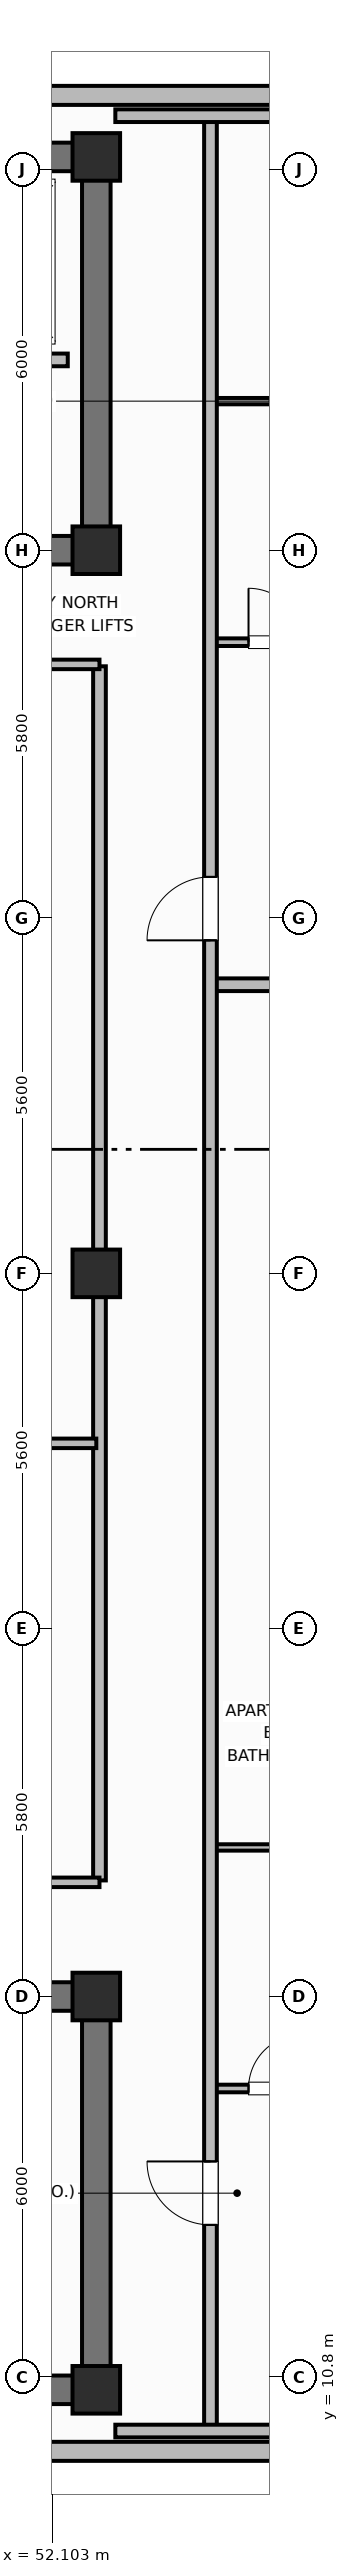
"""IFC4 building model, lengths in metres.
Left out: names, types, materials, properties, quantities, classifications, styles, units other than length and angle.
Written with IfcOpenShell. Run it as: python <this file> out.ifc"""

import sys

from ifc_helpers import new_model, si_unit, direction, frame, frame_2d, origin, origin_2d, place, context, subcontext, project, spatial, rectangle, extrude, element, fill, save


model = new_model("IFC4")
c1 = context("Model", 3, precision=1e-05, world=origin(), true_north=direction((0.0, 1.0)))
c2 = subcontext(c1, "Body", "Model", "MODEL_VIEW")
j1 = project(units=[si_unit("LENGTHUNIT", "METRE"), si_unit("PLANEANGLEUNIT", "RADIAN")], contexts=[c1])
p1 = place(None, origin())
s1 = spatial("IfcSite", under=j1, at=p1, CompositionType="ELEMENT")
p2 = place(p1, origin())
s2 = spatial("IfcBuilding", under=s1, at=p2, CompositionType="ELEMENT")
p3 = place(p2, frame((0.0, 0.0, 282.4)))
s3 = spatial("IfcBuildingStorey", under=s2, at=p3, CompositionType="ELEMENT", Elevation=282.4)
p4 = place(p3, frame((52.8, 10.6, 0.0), z_axis=(0.0, 0.0, 1.0), x_axis=(-1.0, 0.0, 0.0)))
e1 = element("IfcWall", 1, at=p4, inside=s3, PredefinedType="SHEAR", context=c2, shape_type="SweptSolid", body=[
    extrude(rectangle(XDim=27.2, YDim=0.45, at=frame_2d((13.6, 0.0))), origin(), (0.0, 0.0, 1.0), 3.7),
])
p5 = place(p3, frame((52.8, 10.825, 0.0), z_axis=(0.0, 0.0, 1.0), x_axis=(0.0, 1.0, 0.0)))
e2 = element("IfcWall", 2, at=p5, inside=s3, PredefinedType="SHEAR", context=c2, shape_type="SweptSolid", body=[
    extrude(rectangle(XDim=5.75, YDim=0.45, at=frame_2d((2.875, 0.0))), origin(), (0.0, 0.0, 1.0), 3.7),
])
p6 = place(p3, frame((25.6, 16.8, 0.0), z_axis=(0.0, 0.0, 1.0), x_axis=(1.0, 0.0, 0.0)))
e3 = element("IfcWall", 3, at=p6, inside=s3, PredefinedType="SHEAR", context=c2, shape_type="SweptSolid", body=[
    extrude(rectangle(XDim=27.2, YDim=0.45, at=frame_2d((13.6, 0.0))), origin(), (0.0, 0.0, 1.0), 3.7),
])
p7 = place(p6, frame((1.9, 0.0, 0.0)))
e4 = element("IfcOpeningElement", 4, at=p7, cuts=e3, PredefinedType="OPENING", context=c2, shape_type="SweptSolid", body=[
    extrude(rectangle(XDim=1.1, YDim=2.15, at=frame_2d((0.55, 1.075))), frame((0.0, 0.235, 0.0), z_axis=(0.0, -1.0, 0.0), x_axis=(1.0, 0.0, 0.0)), (0.0, 0.0, 1.0), 0.47),
])
p8 = place(p6, frame((13.0, 0.0, 0.0)))
e5 = element("IfcOpeningElement", 5, at=p8, cuts=e3, PredefinedType="OPENING", context=c2, shape_type="SweptSolid", body=[
    extrude(rectangle(XDim=1.2, YDim=2.15, at=frame_2d((0.6, 1.075))), frame((0.0, 0.235, 0.0), z_axis=(0.0, -1.0, 0.0), x_axis=(1.0, 0.0, 0.0)), (0.0, 0.0, 1.0), 0.47),
])
p9 = place(p6, frame((21.6, 0.0, 0.0)))
e6 = element("IfcOpeningElement", 6, at=p9, cuts=e3, PredefinedType="OPENING", context=c2, shape_type="SweptSolid", body=[
    extrude(rectangle(XDim=1.0, YDim=2.15, at=frame_2d((0.5, 1.075))), frame((0.0, 0.235, 0.0), z_axis=(0.0, -1.0, 0.0), x_axis=(1.0, 0.0, 0.0)), (0.0, 0.0, 1.0), 0.47),
])
p10 = place(p3, frame((25.6, 45.8, 0.0), z_axis=(0.0, 0.0, 1.0), x_axis=(1.0, 0.0, 0.0)))
e7 = element("IfcWall", 7, at=p10, inside=s3, PredefinedType="SHEAR", context=c2, shape_type="SweptSolid", body=[
    extrude(rectangle(XDim=27.2, YDim=0.45, at=frame_2d((13.6, 0.0))), origin(), (0.0, 0.0, 1.0), 3.7),
])
p11 = place(p3, frame((52.8, 39.825, 0.0), z_axis=(0.0, 0.0, 1.0), x_axis=(0.0, 1.0, 0.0)))
e8 = element("IfcWall", 8, at=p11, inside=s3, PredefinedType="SHEAR", context=c2, shape_type="SweptSolid", body=[
    extrude(rectangle(XDim=5.75, YDim=0.45, at=frame_2d((2.875, 0.0))), origin(), (0.0, 0.0, 1.0), 3.7),
])
p12 = place(p3, frame((52.8, 39.6, 0.0), z_axis=(0.0, 0.0, 1.0), x_axis=(-1.0, 0.0, 0.0)))
e9 = element("IfcWall", 9, at=p12, inside=s3, PredefinedType="SHEAR", context=c2, shape_type="SweptSolid", body=[
    extrude(rectangle(XDim=27.2, YDim=0.45, at=frame_2d((13.6, 0.0))), origin(), (0.0, 0.0, 1.0), 3.7),
])
p13 = place(p12, frame((24.2, 0.0, 0.0)))
e10 = element("IfcOpeningElement", 10, at=p13, cuts=e9, PredefinedType="OPENING", context=c2, shape_type="SweptSolid", body=[
    extrude(rectangle(XDim=1.1, YDim=2.15, at=frame_2d((0.55, 1.075))), frame((0.0, 0.235, 0.0), z_axis=(0.0, -1.0, 0.0), x_axis=(1.0, 0.0, 0.0)), (0.0, 0.0, 1.0), 0.47),
])
p14 = place(p12, frame((15.1, 0.0, 0.0)))
e11 = element("IfcOpeningElement", 11, at=p14, cuts=e9, PredefinedType="OPENING", context=c2, shape_type="SweptSolid", body=[
    extrude(rectangle(XDim=1.2, YDim=2.15, at=frame_2d((0.6, 1.075))), frame((0.0, 0.235, 0.0), z_axis=(0.0, -1.0, 0.0), x_axis=(1.0, 0.0, 0.0)), (0.0, 0.0, 1.0), 0.47),
])
p15 = place(p12, frame((11.6, 0.0, 0.0)))
e12 = element("IfcOpeningElement", 12, at=p15, cuts=e9, PredefinedType="OPENING", context=c2, shape_type="SweptSolid", body=[
    extrude(rectangle(XDim=0.9, YDim=2.1, at=frame_2d((0.45, 1.05))), frame((0.0, 0.235, 0.0), z_axis=(0.0, -1.0, 0.0), x_axis=(1.0, 0.0, 0.0)), (0.0, 0.0, 1.0), 0.47),
])
p16 = place(p12, frame((7.35, 0.0, 0.0)))
e13 = element("IfcOpeningElement", 13, at=p16, cuts=e9, PredefinedType="OPENING", context=c2, shape_type="SweptSolid", body=[
    extrude(rectangle(XDim=0.85, YDim=2.1, at=frame_2d((0.425, 1.05))), frame((0.0, 0.235, 0.0), z_axis=(0.0, -1.0, 0.0), x_axis=(1.0, 0.0, 0.0)), (0.0, 0.0, 1.0), 0.47),
])
p17 = place(p12, frame((4.2, 0.0, 0.0)))
e14 = element("IfcOpeningElement", 14, at=p17, cuts=e9, PredefinedType="OPENING", context=c2, shape_type="SweptSolid", body=[
    extrude(rectangle(XDim=1.3, YDim=2.2, at=frame_2d((0.65, 1.1))), frame((0.0, 0.235, 0.0), z_axis=(0.0, -1.0, 0.0), x_axis=(1.0, 0.0, 0.0)), (0.0, 0.0, 1.0), 0.47),
])
for number, where, z_axis, x_axis in (
    (15, (52.8, 10.6, 0.0), (0.0, 0.0, 1.0), (1.0, 0.0, 0.0)),
    (16, (52.8, 16.8, 0.0), (0.0, 0.0, 1.0), (1.0, 0.0, 0.0)),
    (17, (52.8, 39.6, 0.0), (0.0, 0.0, 1.0), (1.0, 0.0, 0.0)),
    (18, (52.8, 45.8, 0.0), (0.0, 0.0, 1.0), (1.0, 0.0, 0.0)),
    (19, (52.8, 28.2, 0.0), (0.0, 0.0, 1.0), (1.0, 0.0, 0.0)),
):
    element("IfcColumn", number, at=place(p3, frame(where, z_axis=z_axis, x_axis=x_axis)), inside=s3, PredefinedType="COLUMN", context=c2, shape_type="SweptSolid", body=[
        extrude(rectangle(XDim=0.75, YDim=0.75, at=origin_2d()), origin(), (0.0, 0.0, 1.0), 3.7),
    ])
p18 = place(p3, frame((22.56, 9.63, 0.0), z_axis=(0.0, 0.0, 1.0), x_axis=(1.0, 0.0, 0.0)))
e20 = element("IfcWall", 20, at=p18, inside=s3, PredefinedType="SOLIDWALL", context=c2, shape_type="SweptSolid", body=[
    extrude(rectangle(XDim=33.28, YDim=0.3, at=frame_2d((16.64, 0.0))), origin(), (0.0, 0.0, 1.0), 2.73),
])
p19 = place(p18, frame((5.18, 0.0, 0.71)))
e21 = element("IfcOpeningElement", 21, at=p19, cuts=e20, PredefinedType="OPENING", context=c2, shape_type="SweptSolid", body=[
    extrude(rectangle(XDim=1.6, YDim=1.9, at=frame_2d((0.8, 0.95))), frame((0.0, 0.16, 0.0), z_axis=(0.0, -1.0, 0.0), x_axis=(1.0, 0.0, 0.0)), (0.0, 0.0, 1.0), 0.32),
])
p20 = place(p18, frame((8.733, 0.0, 0.71)))
e22 = element("IfcOpeningElement", 22, at=p20, cuts=e20, PredefinedType="OPENING", context=c2, shape_type="SweptSolid", body=[
    extrude(rectangle(XDim=1.6, YDim=1.9, at=frame_2d((0.8, 0.95))), frame((0.0, 0.16, 0.0), z_axis=(0.0, -1.0, 0.0), x_axis=(1.0, 0.0, 0.0)), (0.0, 0.0, 1.0), 0.32),
])
p21 = place(p18, frame((15.84, 0.0, 0.71)))
e23 = element("IfcOpeningElement", 23, at=p21, cuts=e20, PredefinedType="OPENING", context=c2, shape_type="SweptSolid", body=[
    extrude(rectangle(XDim=1.6, YDim=1.9, at=frame_2d((0.8, 0.95))), frame((0.0, 0.16, 0.0), z_axis=(0.0, -1.0, 0.0), x_axis=(1.0, 0.0, 0.0)), (0.0, 0.0, 1.0), 0.32),
])
p22 = place(p18, frame((22.947, 0.0, 0.71)))
e24 = element("IfcOpeningElement", 24, at=p22, cuts=e20, PredefinedType="OPENING", context=c2, shape_type="SweptSolid", body=[
    extrude(rectangle(XDim=1.6, YDim=1.9, at=frame_2d((0.8, 0.95))), frame((0.0, 0.16, 0.0), z_axis=(0.0, -1.0, 0.0), x_axis=(1.0, 0.0, 0.0)), (0.0, 0.0, 1.0), 0.32),
])
p23 = place(p18, frame((26.5, 0.0, 0.71)))
e25 = element("IfcOpeningElement", 25, at=p23, cuts=e20, PredefinedType="OPENING", context=c2, shape_type="SweptSolid", body=[
    extrude(rectangle(XDim=1.6, YDim=1.9, at=frame_2d((0.8, 0.95))), frame((0.0, 0.16, 0.0), z_axis=(0.0, -1.0, 0.0), x_axis=(1.0, 0.0, 0.0)), (0.0, 0.0, 1.0), 0.32),
])
p24 = place(p3, frame((55.84, 46.77, 0.0), z_axis=(0.0, 0.0, 1.0), x_axis=(-1.0, 0.0, 0.0)))
e26 = element("IfcWall", 26, at=p24, inside=s3, PredefinedType="SOLIDWALL", context=c2, shape_type="SweptSolid", body=[
    extrude(rectangle(XDim=33.28, YDim=0.3, at=frame_2d((16.64, 0.0))), origin(), (0.0, 0.0, 1.0), 2.73),
])
p25 = place(p24, frame((5.596, 0.0, 0.71)))
e27 = element("IfcOpeningElement", 27, at=p25, cuts=e26, PredefinedType="OPENING", context=c2, shape_type="SweptSolid", body=[
    extrude(rectangle(XDim=2.1, YDim=1.9, at=frame_2d((1.05, 0.95))), frame((0.0, 0.16, 0.0), z_axis=(0.0, -1.0, 0.0), x_axis=(1.0, 0.0, 0.0)), (0.0, 0.0, 1.0), 0.32),
])
p26 = place(p24, frame((9.244, 0.0, 0.71)))
e28 = element("IfcOpeningElement", 28, at=p26, cuts=e26, PredefinedType="OPENING", context=c2, shape_type="SweptSolid", body=[
    extrude(rectangle(XDim=2.1, YDim=1.9, at=frame_2d((1.05, 0.95))), frame((0.0, 0.16, 0.0), z_axis=(0.0, -1.0, 0.0), x_axis=(1.0, 0.0, 0.0)), (0.0, 0.0, 1.0), 0.32),
])
p27 = place(p24, frame((13.941, 0.0, 0.71)))
e29 = element("IfcOpeningElement", 29, at=p27, cuts=e26, PredefinedType="OPENING", context=c2, shape_type="SweptSolid", body=[
    extrude(rectangle(XDim=2.1, YDim=1.9, at=frame_2d((1.05, 0.95))), frame((0.0, 0.16, 0.0), z_axis=(0.0, -1.0, 0.0), x_axis=(1.0, 0.0, 0.0)), (0.0, 0.0, 1.0), 0.32),
])
p28 = place(p24, frame((17.239, 0.0, 0.71)))
e30 = element("IfcOpeningElement", 30, at=p28, cuts=e26, PredefinedType="OPENING", context=c2, shape_type="SweptSolid", body=[
    extrude(rectangle(XDim=2.1, YDim=1.9, at=frame_2d((1.05, 0.95))), frame((0.0, 0.16, 0.0), z_axis=(0.0, -1.0, 0.0), x_axis=(1.0, 0.0, 0.0)), (0.0, 0.0, 1.0), 0.32),
])
p29 = place(p24, frame((21.936, 0.0, 0.71)))
e31 = element("IfcOpeningElement", 31, at=p29, cuts=e26, PredefinedType="OPENING", context=c2, shape_type="SweptSolid", body=[
    extrude(rectangle(XDim=2.1, YDim=1.9, at=frame_2d((1.05, 0.95))), frame((0.0, 0.16, 0.0), z_axis=(0.0, -1.0, 0.0), x_axis=(1.0, 0.0, 0.0)), (0.0, 0.0, 1.0), 0.32),
])
p30 = place(p24, frame((25.584, 0.0, 0.71)))
e32 = element("IfcOpeningElement", 32, at=p30, cuts=e26, PredefinedType="OPENING", context=c2, shape_type="SweptSolid", body=[
    extrude(rectangle(XDim=2.1, YDim=1.9, at=frame_2d((1.05, 0.95))), frame((0.0, 0.16, 0.0), z_axis=(0.0, -1.0, 0.0), x_axis=(1.0, 0.0, 0.0)), (0.0, 0.0, 1.0), 0.32),
])
p31 = place(p3, frame((52.35, 42.6, 0.0), z_axis=(0.0, 0.0, 1.0), x_axis=(-1.0, 0.0, 0.0)))
e33 = element("IfcWall", 33, at=p31, inside=s3, PredefinedType="PARTITIONING", context=c2, shape_type="SweptSolid", body=[
    extrude(rectangle(XDim=6.5, YDim=0.2, at=frame_2d((3.25, 0.0))), origin(), (0.0, 0.0, 1.0), 2.56),
])
p32 = place(p31, frame((4.9, 0.0, 0.0)))
e34 = element("IfcOpeningElement", 34, at=p32, cuts=e33, PredefinedType="OPENING", context=c2, shape_type="SweptSolid", body=[
    extrude(rectangle(XDim=1.0, YDim=2.15, at=frame_2d((0.5, 1.075))), frame((0.0, 0.11, 0.0), z_axis=(0.0, -1.0, 0.0), x_axis=(1.0, 0.0, 0.0)), (0.0, 0.0, 1.0), 0.22),
])
p33 = place(p31, frame((2.8, 0.0, 0.0)))
e35 = element("IfcOpeningElement", 35, at=p33, cuts=e33, PredefinedType="OPENING", context=c2, shape_type="SweptSolid", body=[
    extrude(rectangle(XDim=1.0, YDim=2.15, at=frame_2d((0.5, 1.075))), frame((0.0, 0.11, 0.0), z_axis=(0.0, -1.0, 0.0), x_axis=(1.0, 0.0, 0.0)), (0.0, 0.0, 1.0), 0.22),
])
p34 = place(p31, frame((0.7, 0.0, 0.0)))
e36 = element("IfcOpeningElement", 36, at=p34, cuts=e33, PredefinedType="OPENING", context=c2, shape_type="SweptSolid", body=[
    extrude(rectangle(XDim=1.0, YDim=2.15, at=frame_2d((0.5, 1.075))), frame((0.0, 0.11, 0.0), z_axis=(0.0, -1.0, 0.0), x_axis=(1.0, 0.0, 0.0)), (0.0, 0.0, 1.0), 0.22),
])
p35 = place(p3, frame((52.85, 18.63, 0.0), z_axis=(0.0, 0.0, 1.0), x_axis=(0.0, 1.0, 0.0)))
e37 = element("IfcWall", 37, at=p35, inside=s3, PredefinedType="PARTITIONING", context=c2, shape_type="SweptSolid", body=[
    extrude(rectangle(XDim=19.14, YDim=0.2, at=frame_2d((9.57, 0.0))), origin(), (0.0, 0.0, 1.0), 2.56),
])
for number, where, z_axis, x_axis in (
    (38, (29.9, 18.6, 0.0), (0.0, 0.0, 1.0), (1.0, 0.0, 0.0)),
    (39, (29.9, 37.8, 0.0), (0.0, 0.0, 1.0), (1.0, 0.0, 0.0)),
):
    element("IfcWall", number, at=place(p3, frame(where, z_axis=z_axis, x_axis=x_axis)), inside=s3, PredefinedType="PARTITIONING", context=c2, shape_type="SweptSolid", body=[
        extrude(rectangle(XDim=22.95, YDim=0.15, at=frame_2d((11.475, 0.0))), origin(), (0.0, 0.0, 1.0), 2.56),
    ])
p36 = place(p3, frame((29.93, 25.521, 0.0), z_axis=(0.0, 0.0, 1.0), x_axis=(1.0, 0.0, 0.0)))
e40 = element("IfcWall", 40, at=p36, inside=s3, PredefinedType="PARTITIONING", context=c2, shape_type="SweptSolid", body=[
    extrude(rectangle(XDim=22.87, YDim=0.15, at=frame_2d((11.435, 0.0))), origin(), (0.0, 0.0, 1.0), 2.56),
])
p37 = place(p3, frame((54.6, 15.35, 0.0), z_axis=(0.0, 0.0, 1.0), x_axis=(1.0, 0.0, 0.0)))
e41 = element("IfcWall", 41, at=p37, inside=s3, PredefinedType="PARTITIONING", context=c2, shape_type="SweptSolid", body=[
    extrude(rectangle(XDim=1.95, YDim=0.12, at=frame_2d((0.975, 0.0))), origin(), (0.0, 0.0, 1.0), 2.56),
])
p38 = place(p37, frame((0.6, 0.0, 0.0)))
e42 = element("IfcOpeningElement", 42, at=p38, cuts=e41, PredefinedType="OPENING", context=c2, shape_type="SweptSolid", body=[
    extrude(rectangle(XDim=0.85, YDim=2.1, at=frame_2d((0.425, 1.05))), frame((0.0, 0.07, 0.0), z_axis=(0.0, -1.0, 0.0), x_axis=(1.0, 0.0, 0.0)), (0.0, 0.0, 1.0), 0.14),
])
p39 = place(p3, frame((54.6, 19.15, 0.0), z_axis=(0.0, 0.0, 1.0), x_axis=(1.0, 0.0, 0.0)))
e43 = element("IfcWall", 43, at=p39, inside=s3, PredefinedType="PARTITIONING", context=c2, shape_type="SweptSolid", body=[
    extrude(rectangle(XDim=1.95, YDim=0.1, at=frame_2d((0.975, 0.0))), origin(), (0.0, 0.0, 1.0), 2.56),
])
p40 = place(p3, frame((54.6, 32.75, 0.0), z_axis=(0.0, 0.0, 1.0), x_axis=(1.0, 0.0, 0.0)))
e44 = element("IfcWall", 44, at=p40, inside=s3, PredefinedType="PARTITIONING", context=c2, shape_type="SweptSolid", body=[
    extrude(rectangle(XDim=4.27, YDim=0.2, at=frame_2d((2.135, 0.0))), origin(), (0.0, 0.0, 1.0), 2.56),
])
p41 = place(p3, frame((54.6, 38.15, 0.0), z_axis=(0.0, 0.0, 1.0), x_axis=(1.0, 0.0, 0.0)))
e45 = element("IfcWall", 45, at=p41, inside=s3, PredefinedType="PARTITIONING", context=c2, shape_type="SweptSolid", body=[
    extrude(rectangle(XDim=1.95, YDim=0.12, at=frame_2d((0.975, 0.0))), origin(), (0.0, 0.0, 1.0), 2.56),
])
p42 = place(p41, frame((0.6, 0.0, 0.0)))
e46 = element("IfcOpeningElement", 46, at=p42, cuts=e45, PredefinedType="OPENING", context=c2, shape_type="SweptSolid", body=[
    extrude(rectangle(XDim=0.85, YDim=2.1, at=frame_2d((0.425, 1.05))), frame((0.0, 0.07, 0.0), z_axis=(0.0, -1.0, 0.0), x_axis=(1.0, 0.0, 0.0)), (0.0, 0.0, 1.0), 0.14),
])
p43 = place(p3, frame((54.6, 41.95, 0.0), z_axis=(0.0, 0.0, 1.0), x_axis=(1.0, 0.0, 0.0)))
e47 = element("IfcWall", 47, at=p43, inside=s3, PredefinedType="PARTITIONING", context=c2, shape_type="SweptSolid", body=[
    extrude(rectangle(XDim=1.95, YDim=0.1, at=frame_2d((0.975, 0.0))), origin(), (0.0, 0.0, 1.0), 2.56),
])
p44 = place(p3, frame((54.6, 9.95, 0.0), z_axis=(0.0, 0.0, 1.0), x_axis=(0.0, 1.0, 0.0)))
e48 = element("IfcWall", 48, at=p44, inside=s3, PredefinedType="PARTITIONING", context=c2, shape_type="SweptSolid", body=[
    extrude(rectangle(XDim=36.5, YDim=0.2, at=frame_2d((18.25, 0.0))), origin(), (0.0, 0.0, 1.0), 2.56),
])
p45 = place(p44, frame((3.25, 0.0, 0.0)))
e49 = element("IfcOpeningElement", 49, at=p45, cuts=e48, PredefinedType="OPENING", context=c2, shape_type="SweptSolid", body=[
    extrude(rectangle(XDim=1.0, YDim=2.15, at=frame_2d((0.5, 1.075))), frame((0.0, 0.11, 0.0), z_axis=(0.0, -1.0, 0.0), x_axis=(1.0, 0.0, 0.0)), (0.0, 0.0, 1.0), 0.22),
])
p46 = place(p44, frame((23.5, 0.0, 0.0)))
e50 = element("IfcOpeningElement", 50, at=p46, cuts=e48, PredefinedType="OPENING", context=c2, shape_type="SweptSolid", body=[
    extrude(rectangle(XDim=1.0, YDim=2.15, at=frame_2d((0.5, 1.075))), frame((0.0, 0.11, 0.0), z_axis=(0.0, -1.0, 0.0), x_axis=(1.0, 0.0, 0.0)), (0.0, 0.0, 1.0), 0.22),
])
for number, where, z_axis, x_axis in (
    (51, (53.1, 9.95, 0.0), (0.0, 0.0, 1.0), (1.0, 0.0, 0.0)),
    (52, (53.1, 46.45, 0.0), (0.0, 0.0, 1.0), (1.0, 0.0, 0.0)),
):
    element("IfcWall", number, at=place(p3, frame(where, z_axis=z_axis, x_axis=x_axis)), inside=s3, PredefinedType="PARTITIONING", context=c2, shape_type="SweptSolid", body=[
        extrude(rectangle(XDim=3.754, YDim=0.2, at=frame_2d((1.877, 0.0))), origin(), (0.0, 0.0, 1.0), 2.56),
    ])
p47 = place(p38, origin())
e53 = element("IfcDoor", 53, at=p47, inside=s3, OperationType="SINGLE_SWING_RIGHT", PredefinedType="DOOR", context=c2, shape_type="SweptSolid", body=[
    extrude(rectangle(XDim=0.85, YDim=2.1, at=frame_2d((0.425, 1.05))), frame((0.0, 0.025, 0.0), z_axis=(0.0, -1.0, 0.0), x_axis=(1.0, 0.0, 0.0)), (0.0, 0.0, 1.0), 0.05),
])
fill(e42, e53)
p48 = place(p42, origin())
e54 = element("IfcDoor", 54, at=p48, inside=s3, OperationType="SINGLE_SWING_LEFT", PredefinedType="DOOR", context=c2, shape_type="SweptSolid", body=[
    extrude(rectangle(XDim=0.85, YDim=2.1, at=frame_2d((0.425, 1.05))), frame((0.0, 0.025, 0.0), z_axis=(0.0, -1.0, 0.0), x_axis=(1.0, 0.0, 0.0)), (0.0, 0.0, 1.0), 0.05),
])
fill(e46, e54)
p49 = place(p45, origin())
e55 = element("IfcDoor", 55, at=p49, inside=s3, OperationType="SINGLE_SWING_RIGHT", PredefinedType="DOOR", context=c2, shape_type="SweptSolid", body=[
    extrude(rectangle(XDim=1.0, YDim=2.15, at=frame_2d((0.5, 1.075))), frame((0.0, 0.025, 0.0), z_axis=(0.0, -1.0, 0.0), x_axis=(1.0, 0.0, 0.0)), (0.0, 0.0, 1.0), 0.05),
])
fill(e49, e55)
p50 = place(p46, origin())
e56 = element("IfcDoor", 56, at=p50, inside=s3, OperationType="SINGLE_SWING_LEFT", PredefinedType="DOOR", context=c2, shape_type="SweptSolid", body=[
    extrude(rectangle(XDim=1.0, YDim=2.15, at=frame_2d((0.5, 1.075))), frame((0.0, 0.025, 0.0), z_axis=(0.0, -1.0, 0.0), x_axis=(1.0, 0.0, 0.0)), (0.0, 0.0, 1.0), 0.05),
])
fill(e50, e56)
save(model, sys.argv[1])
